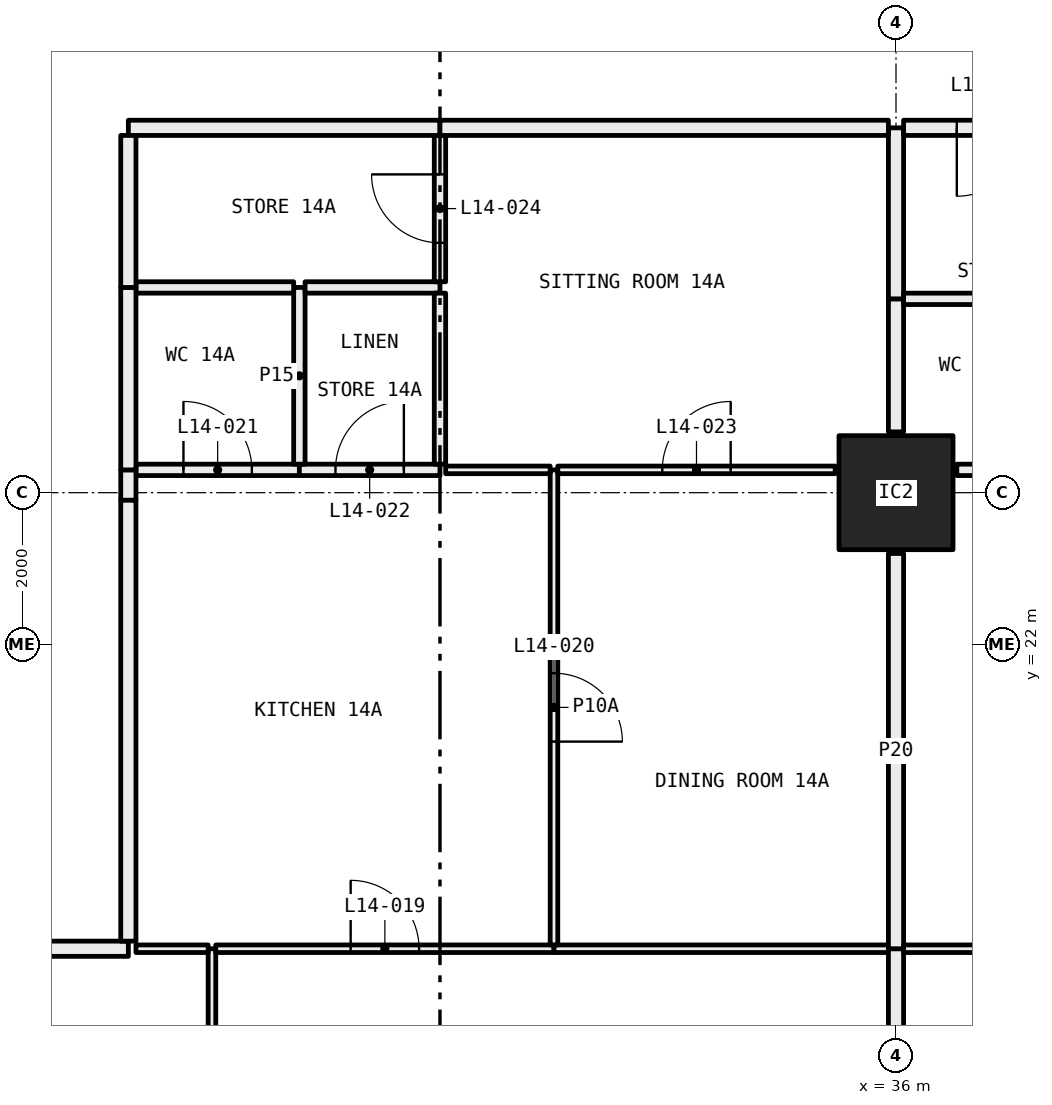
"""IFC4 building model, lengths in metres.
Left out: names, types, materials, properties, quantities, classifications, styles, units other than length and angle.
Written with IfcOpenShell. Run it as: python <this file> out.ifc"""

import sys

from ifc_helpers import new_model, si_unit, direction, frame, frame_2d, origin, origin_2d, place, context, subcontext, project, spatial, rectangle, hollow_rectangle, extrude, element, fill, save


model = new_model("IFC4")
c1 = context("Model", 3, precision=1e-05, world=origin(), true_north=direction((0.0, 1.0)))
c2 = subcontext(c1, "Body", "Model", "MODEL_VIEW")
j1 = project(units=[si_unit("LENGTHUNIT", "METRE"), si_unit("PLANEANGLEUNIT", "RADIAN")], contexts=[c1])
p1 = place(None, origin())
s1 = spatial("IfcSite", under=j1, at=p1, CompositionType="ELEMENT")
p2 = place(p1, origin())
s2 = spatial("IfcBuilding", under=s1, at=p2, CompositionType="ELEMENT")
p3 = place(p2, frame((0.0, 0.0, 61.05)))
s3 = spatial("IfcBuildingStorey", under=s2, at=p3, CompositionType="ELEMENT", Elevation=61.05)
p4 = place(p3, frame((36.0, 24.0, 0.0), z_axis=(0.0, 0.0, 1.0), x_axis=(1.0, 0.0, 0.0)))
e1 = element("IfcColumn", 1, at=p4, inside=s3, PredefinedType="COLUMN", context=c2, shape_type="SweptSolid", body=[
    extrude(hollow_rectangle(XDim=1.5, YDim=1.5, WallThickness=0.065, at=origin_2d()), origin(), (0.0, 0.0, 1.0), 3.05),
])
p5 = place(p3, frame((27.0, 12.05, 0.0), z_axis=(0.0, 0.0, 1.0), x_axis=(0.0, 1.0, 0.0)))
e2 = element("IfcWall", 2, at=p5, inside=s3, PredefinedType="PARTITIONING", context=c2, shape_type="SweptSolid", body=[
    extrude(rectangle(XDim=5.95, YDim=0.1, at=frame_2d((2.975, 0.0))), origin(), (0.0, 0.0, 1.0), 2.45),
])
p6 = place(p3, frame((26.95, 18.0, 0.0), z_axis=(0.0, 0.0, 1.0), x_axis=(-1.0, 0.0, 0.0)))
e3 = element("IfcWall", 3, at=p6, inside=s3, PredefinedType="PARTITIONING", context=c2, shape_type="SweptSolid", body=[
    extrude(rectangle(XDim=0.95, YDim=0.1, at=frame_2d((0.475, 0.0))), origin(), (0.0, 0.0, 1.0), 3.05),
])
p7 = place(p3, frame((25.9, 18.0, 0.0), z_axis=(0.0, 0.0, 1.0), x_axis=(-1.0, 0.0, 0.0)))
e4 = element("IfcWall", 4, at=p7, inside=s3, PredefinedType="PARTITIONING", context=c2, shape_type="SweptSolid", body=[
    extrude(rectangle(XDim=7.9, YDim=0.2, at=frame_2d((3.95, 0.0))), origin(), (0.0, 0.0, 1.0), 3.05),
])
p8 = place(p3, frame((31.5, 18.0, 0.0), z_axis=(0.0, 0.0, 1.0), x_axis=(-1.0, 0.0, 0.0)))
e5 = element("IfcWall", 5, at=p8, inside=s3, PredefinedType="PARTITIONING", context=c2, shape_type="SweptSolid", body=[
    extrude(rectangle(XDim=4.45, YDim=0.1, at=frame_2d((2.225, 0.0))), origin(), (0.0, 0.0, 1.0), 3.05),
])
p9 = place(p8, frame((1.775, 0.0, 0.0)))
e6 = element("IfcOpeningElement", 6, at=p9, cuts=e5, PredefinedType="OPENING", context=c2, shape_type="SweptSolid", body=[
    extrude(rectangle(XDim=0.9, YDim=2.1, at=frame_2d((0.45, 1.05))), frame((0.0, 0.06, 0.0), z_axis=(0.0, -1.0, 0.0), x_axis=(1.0, 0.0, 0.0)), (0.0, 0.0, 1.0), 0.12),
])
p10 = place(p3, frame((35.9, 18.0, 0.0), z_axis=(0.0, 0.0, 1.0), x_axis=(-1.0, 0.0, 0.0)))
e7 = element("IfcWall", 7, at=p10, inside=s3, PredefinedType="PARTITIONING", context=c2, shape_type="SweptSolid", body=[
    extrude(rectangle(XDim=4.4, YDim=0.1, at=frame_2d((2.2, 0.0))), origin(), (0.0, 0.0, 1.0), 3.05),
])
p11 = place(p3, frame((36.0, 12.8, 0.0), z_axis=(0.0, 0.0, 1.0), x_axis=(0.0, 1.0, 0.0)))
e8 = element("IfcWall", 8, at=p11, inside=s3, PredefinedType="PARTITIONING", context=c2, shape_type="SweptSolid", body=[
    extrude(rectangle(XDim=5.2, YDim=0.2, at=frame_2d((2.6, 0.0))), origin(), (0.0, 0.0, 1.0), 2.45),
])
p12 = place(p3, frame((31.5, 18.05, 0.0), z_axis=(0.0, 0.0, 1.0), x_axis=(0.0, 1.0, 0.0)))
e9 = element("IfcWall", 9, at=p12, inside=s3, PredefinedType="PARTITIONING", context=c2, shape_type="SweptSolid", body=[
    extrude(rectangle(XDim=6.25, YDim=0.1, at=frame_2d((3.125, 0.0))), origin(), (0.0, 0.0, 1.0), 2.45),
])
p13 = place(p12, frame((2.675, 0.0, 0.0)))
e10 = element("IfcOpeningElement", 10, at=p13, cuts=e9, PredefinedType="OPENING", context=c2, shape_type="SweptSolid", body=[
    extrude(rectangle(XDim=0.9, YDim=2.1, at=frame_2d((0.45, 1.05))), frame((0.0, 0.06, 0.0), z_axis=(0.0, -1.0, 0.0), x_axis=(1.0, 0.0, 0.0)), (0.0, 0.0, 1.0), 0.12),
])
p14 = place(p3, frame((28.15, 24.3, 0.0), z_axis=(0.0, 0.0, 1.0), x_axis=(-1.0, 0.0, 0.0)))
e11 = element("IfcWall", 11, at=p14, inside=s3, PredefinedType="PARTITIONING", context=c2, shape_type="SweptSolid", body=[
    extrude(rectangle(XDim=2.15, YDim=0.15, at=frame_2d((1.075, 0.0))), origin(), (0.0, 0.0, 1.0), 3.05),
])
p15 = place(p14, frame((0.625, 0.0, 0.0)))
e12 = element("IfcOpeningElement", 12, at=p15, cuts=e11, PredefinedType="OPENING", context=c2, shape_type="SweptSolid", body=[
    extrude(rectangle(XDim=0.9, YDim=2.1, at=frame_2d((0.45, 1.05))), frame((0.0, 0.085, 0.0), z_axis=(0.0, -1.0, 0.0), x_axis=(1.0, 0.0, 0.0)), (0.0, 0.0, 1.0), 0.17),
])
p16 = place(p3, frame((30.0, 24.3, 0.0), z_axis=(0.0, 0.0, 1.0), x_axis=(-1.0, 0.0, 0.0)))
e13 = element("IfcWall", 13, at=p16, inside=s3, PredefinedType="PARTITIONING", context=c2, shape_type="SweptSolid", body=[
    extrude(rectangle(XDim=1.85, YDim=0.15, at=frame_2d((0.925, 0.0))), origin(), (0.0, 0.0, 1.0), 3.05),
])
p17 = place(p16, frame((0.475, 0.0, 0.0)))
e14 = element("IfcOpeningElement", 14, at=p17, cuts=e13, PredefinedType="OPENING", context=c2, shape_type="SweptSolid", body=[
    extrude(rectangle(XDim=0.9, YDim=2.1, at=frame_2d((0.45, 1.05))), frame((0.0, 0.085, 0.0), z_axis=(0.0, -1.0, 0.0), x_axis=(1.0, 0.0, 0.0)), (0.0, 0.0, 1.0), 0.17),
])
p18 = place(p3, frame((31.45, 24.3, 0.0), z_axis=(0.0, 0.0, 1.0), x_axis=(-1.0, 0.0, 0.0)))
e15 = element("IfcWall", 15, at=p18, inside=s3, PredefinedType="PARTITIONING", context=c2, shape_type="SweptSolid", body=[
    extrude(rectangle(XDim=1.375, YDim=0.1, at=frame_2d((0.688, 0.0))), origin(), (0.0, 0.0, 1.0), 3.05),
])
p19 = place(p3, frame((25.9, 24.3, 0.0), z_axis=(0.0, 0.0, 1.0), x_axis=(0.0, -1.0, 0.0)))
e16 = element("IfcWall", 16, at=p19, inside=s3, PredefinedType="PARTITIONING", context=c2, shape_type="SweptSolid", body=[
    extrude(rectangle(XDim=0.4, YDim=0.2, at=frame_2d((0.2, 0.0))), origin(), (0.0, 0.0, 1.0), 2.45),
])
p20 = place(p3, frame((25.9, 23.9, 0.0), z_axis=(0.0, 0.0, 1.0), x_axis=(0.0, -1.0, 0.0)))
e17 = element("IfcWall", 17, at=p20, inside=s3, PredefinedType="PARTITIONING", context=c2, shape_type="SweptSolid", body=[
    extrude(rectangle(XDim=5.8, YDim=0.2, at=frame_2d((2.9, 0.0))), origin(), (0.0, 0.0, 1.0), 3.05),
])
p21 = place(p3, frame((35.2, 24.3, 0.0), z_axis=(0.0, 0.0, 1.0), x_axis=(-1.0, 0.0, 0.0)))
e18 = element("IfcWall", 18, at=p21, inside=s3, PredefinedType="PARTITIONING", context=c2, shape_type="SweptSolid", body=[
    extrude(rectangle(XDim=3.65, YDim=0.1, at=frame_2d((1.825, 0.0))), origin(), (0.0, 0.0, 1.0), 3.05),
])
p22 = place(p21, frame((1.375, 0.0, 0.0)))
e19 = element("IfcOpeningElement", 19, at=p22, cuts=e18, PredefinedType="OPENING", context=c2, shape_type="SweptSolid", body=[
    extrude(rectangle(XDim=0.9, YDim=2.1, at=frame_2d((0.45, 1.05))), frame((0.0, 0.06, 0.0), z_axis=(0.0, -1.0, 0.0), x_axis=(1.0, 0.0, 0.0)), (0.0, 0.0, 1.0), 0.12),
])
p23 = place(p3, frame((36.0, 18.0, 0.0), z_axis=(0.0, 0.0, 1.0), x_axis=(0.0, 1.0, 0.0)))
e20 = element("IfcWall", 20, at=p23, inside=s3, PredefinedType="PARTITIONING", context=c2, shape_type="SweptSolid", body=[
    extrude(rectangle(XDim=5.2, YDim=0.2, at=frame_2d((2.6, 0.0))), origin(), (0.0, 0.0, 1.0), 2.45),
])
p24 = place(p3, frame((28.15, 24.375, 0.0), z_axis=(0.0, 0.0, 1.0), x_axis=(0.0, 1.0, 0.0)))
e21 = element("IfcWall", 21, at=p24, inside=s3, PredefinedType="PARTITIONING", context=c2, shape_type="SweptSolid", body=[
    extrude(rectangle(XDim=2.325, YDim=0.15, at=frame_2d((1.163, 0.0))), origin(), (0.0, 0.0, 1.0), 3.05),
])
p25 = place(p3, frame((28.075, 26.7, 0.0), z_axis=(0.0, 0.0, 1.0), x_axis=(-1.0, 0.0, 0.0)))
e22 = element("IfcWall", 22, at=p25, inside=s3, PredefinedType="PARTITIONING", context=c2, shape_type="SweptSolid", body=[
    extrude(rectangle(XDim=2.075, YDim=0.15, at=frame_2d((1.038, 0.0))), origin(), (0.0, 0.0, 1.0), 3.05),
])
p26 = place(p3, frame((25.9, 26.7, 0.0), z_axis=(0.0, 0.0, 1.0), x_axis=(0.0, -1.0, 0.0)))
e23 = element("IfcWall", 23, at=p26, inside=s3, PredefinedType="PARTITIONING", context=c2, shape_type="SweptSolid", body=[
    extrude(rectangle(XDim=2.4, YDim=0.2, at=frame_2d((1.2, 0.0))), origin(), (0.0, 0.0, 1.0), 3.05),
])
p27 = place(p3, frame((30.0, 26.7, 0.0), z_axis=(0.0, 0.0, 1.0), x_axis=(-1.0, 0.0, 0.0)))
e24 = element("IfcWall", 24, at=p27, inside=s3, PredefinedType="PARTITIONING", context=c2, shape_type="SweptSolid", body=[
    extrude(rectangle(XDim=1.775, YDim=0.15, at=frame_2d((0.887, 0.0))), origin(), (0.0, 0.0, 1.0), 3.05),
])
p28 = place(p3, frame((30.0, 24.375, 0.0), z_axis=(0.0, 0.0, 1.0), x_axis=(0.0, 1.0, 0.0)))
e25 = element("IfcWall", 25, at=p28, inside=s3, PredefinedType="PARTITIONING", context=c2, shape_type="SweptSolid", body=[
    extrude(rectangle(XDim=2.25, YDim=0.15, at=frame_2d((1.125, 0.0))), origin(), (0.0, 0.0, 1.0), 3.05),
])
p29 = place(p3, frame((30.0, 26.775, 0.0), z_axis=(0.0, 0.0, 1.0), x_axis=(0.0, 1.0, 0.0)))
e26 = element("IfcWall", 26, at=p29, inside=s3, PredefinedType="PARTITIONING", context=c2, shape_type="SweptSolid", body=[
    extrude(rectangle(XDim=1.925, YDim=0.15, at=frame_2d((0.962, 0.0))), origin(), (0.0, 0.0, 1.0), 3.05),
])
p30 = place(p29, frame((0.512, 0.0, 0.0)))
e27 = element("IfcOpeningElement", 27, at=p30, cuts=e26, PredefinedType="OPENING", context=c2, shape_type="SweptSolid", body=[
    extrude(rectangle(XDim=0.9, YDim=2.1, at=frame_2d((0.45, 1.05))), frame((0.0, 0.085, 0.0), z_axis=(0.0, -1.0, 0.0), x_axis=(1.0, 0.0, 0.0)), (0.0, 0.0, 1.0), 0.17),
])
p31 = place(p3, frame((30.0, 28.8, 0.0), z_axis=(0.0, 0.0, 1.0), x_axis=(-1.0, 0.0, 0.0)))
e28 = element("IfcWall", 28, at=p31, inside=s3, PredefinedType="PARTITIONING", context=c2, shape_type="SweptSolid", body=[
    extrude(rectangle(XDim=4.1, YDim=0.2, at=frame_2d((2.05, 0.0))), origin(), (0.0, 0.0, 1.0), 3.05),
])
p32 = place(p3, frame((25.9, 28.7, 0.0), z_axis=(0.0, 0.0, 1.0), x_axis=(0.0, -1.0, 0.0)))
e29 = element("IfcWall", 29, at=p32, inside=s3, PredefinedType="PARTITIONING", context=c2, shape_type="SweptSolid", body=[
    extrude(rectangle(XDim=2.0, YDim=0.2, at=frame_2d((1.0, 0.0))), origin(), (0.0, 0.0, 1.0), 3.05),
])
p33 = place(p3, frame((36.0, 24.8, 0.0), z_axis=(0.0, 0.0, 1.0), x_axis=(0.0, 1.0, 0.0)))
e30 = element("IfcWall", 30, at=p33, inside=s3, PredefinedType="PARTITIONING", context=c2, shape_type="SweptSolid", body=[
    extrude(rectangle(XDim=1.75, YDim=0.2, at=frame_2d((0.875, 0.0))), origin(), (0.0, 0.0, 1.0), 2.45),
])
p34 = place(p3, frame((36.0, 26.55, 0.0), z_axis=(0.0, 0.0, 1.0), x_axis=(0.0, 1.0, 0.0)))
e31 = element("IfcWall", 31, at=p34, inside=s3, PredefinedType="PARTITIONING", context=c2, shape_type="SweptSolid", body=[
    extrude(rectangle(XDim=2.25, YDim=0.2, at=frame_2d((1.125, 0.0))), origin(), (0.0, 0.0, 1.0), 2.45),
])
p35 = place(p3, frame((35.9, 28.8, 0.0), z_axis=(0.0, 0.0, 1.0), x_axis=(-1.0, 0.0, 0.0)))
e32 = element("IfcWall", 32, at=p35, inside=s3, PredefinedType="PARTITIONING", context=c2, shape_type="SweptSolid", body=[
    extrude(rectangle(XDim=5.9, YDim=0.2, at=frame_2d((2.95, 0.0))), origin(), (0.0, 0.0, 1.0), 3.05),
])
p36 = place(p3, frame((40.5, 18.0, 0.0), z_axis=(0.0, 0.0, 1.0), x_axis=(-1.0, 0.0, 0.0)))
e33 = element("IfcWall", 33, at=p36, inside=s3, PredefinedType="PARTITIONING", context=c2, shape_type="SweptSolid", body=[
    extrude(rectangle(XDim=4.4, YDim=0.1, at=frame_2d((2.2, 0.0))), origin(), (0.0, 0.0, 1.0), 3.05),
])
p37 = place(p36, frame((1.75, 0.0, 0.0)))
e34 = element("IfcOpeningElement", 34, at=p37, cuts=e33, PredefinedType="OPENING", context=c2, shape_type="SweptSolid", body=[
    extrude(rectangle(XDim=0.9, YDim=2.1, at=frame_2d((0.45, 1.05))), frame((0.0, 0.06, 0.0), z_axis=(0.0, -1.0, 0.0), x_axis=(1.0, 0.0, 0.0)), (0.0, 0.0, 1.0), 0.12),
])
p38 = place(p3, frame((38.4, 24.3, 0.0), z_axis=(0.0, 0.0, 1.0), x_axis=(-1.0, 0.0, 0.0)))
e35 = element("IfcWall", 35, at=p38, inside=s3, PredefinedType="PARTITIONING", context=c2, shape_type="SweptSolid", body=[
    extrude(rectangle(XDim=1.6, YDim=0.15, at=frame_2d((0.8, 0.0))), origin(), (0.0, 0.0, 1.0), 3.05),
])
p39 = place(p38, frame((0.35, 0.0, 0.0)))
e36 = element("IfcOpeningElement", 36, at=p39, cuts=e35, PredefinedType="OPENING", context=c2, shape_type="SweptSolid", body=[
    extrude(rectangle(XDim=0.9, YDim=2.1, at=frame_2d((0.45, 1.05))), frame((0.0, 0.085, 0.0), z_axis=(0.0, -1.0, 0.0), x_axis=(1.0, 0.0, 0.0)), (0.0, 0.0, 1.0), 0.17),
])
p40 = place(p3, frame((38.4, 26.55, 0.0), z_axis=(0.0, 0.0, 1.0), x_axis=(-1.0, 0.0, 0.0)))
e37 = element("IfcWall", 37, at=p40, inside=s3, PredefinedType="PARTITIONING", context=c2, shape_type="SweptSolid", body=[
    extrude(rectangle(XDim=2.3, YDim=0.15, at=frame_2d((1.15, 0.0))), origin(), (0.0, 0.0, 1.0), 3.05),
])
p41 = place(p3, frame((38.4, 28.8, 0.0), z_axis=(0.0, 0.0, 1.0), x_axis=(-1.0, 0.0, 0.0)))
e38 = element("IfcWall", 38, at=p41, inside=s3, PredefinedType="PARTITIONING", context=c2, shape_type="SweptSolid", body=[
    extrude(rectangle(XDim=2.3, YDim=0.2, at=frame_2d((1.15, 0.0))), origin(), (0.0, 0.0, 1.0), 3.05),
])
p42 = place(p41, frame((0.7, 0.0, 0.0)))
e39 = element("IfcOpeningElement", 39, at=p42, cuts=e38, PredefinedType="OPENING", context=c2, shape_type="SweptSolid", body=[
    extrude(rectangle(XDim=0.9, YDim=2.1, at=frame_2d((0.45, 1.05))), frame((0.0, 0.11, 0.0), z_axis=(0.0, -1.0, 0.0), x_axis=(1.0, 0.0, 0.0)), (0.0, 0.0, 1.0), 0.22),
])
p43 = place(p9, frame((0.9, 0.0, 0.0), x_axis=(-1.0, 0.0, 0.0)))
e40 = element("IfcDoor", 40, at=p43, inside=s3, OperationType="SINGLE_SWING_RIGHT", PredefinedType="DOOR", context=c2, shape_type="SweptSolid", body=[
    extrude(rectangle(XDim=0.9, YDim=2.1, at=frame_2d((0.45, 1.05))), frame((0.0, 0.025, 0.0), z_axis=(0.0, -1.0, 0.0), x_axis=(1.0, 0.0, 0.0)), (0.0, 0.0, 1.0), 0.05),
])
fill(e6, e40)
p44 = place(p13, frame((0.9, 0.0, 0.0), x_axis=(-1.0, 0.0, 0.0)))
e41 = element("IfcDoor", 41, at=p44, inside=s3, OperationType="SINGLE_SWING_LEFT", PredefinedType="DOOR", context=c2, shape_type="SweptSolid", body=[
    extrude(rectangle(XDim=0.9, YDim=2.1, at=frame_2d((0.45, 1.05))), frame((0.0, 0.025, 0.0), z_axis=(0.0, -1.0, 0.0), x_axis=(1.0, 0.0, 0.0)), (0.0, 0.0, 1.0), 0.05),
])
fill(e10, e41)
p45 = place(p15, frame((0.9, 0.0, 0.0), x_axis=(-1.0, 0.0, 0.0)))
e42 = element("IfcDoor", 42, at=p45, inside=s3, OperationType="SINGLE_SWING_RIGHT", PredefinedType="DOOR", context=c2, shape_type="SweptSolid", body=[
    extrude(rectangle(XDim=0.9, YDim=2.1, at=frame_2d((0.45, 1.05))), frame((0.0, 0.025, 0.0), z_axis=(0.0, -1.0, 0.0), x_axis=(1.0, 0.0, 0.0)), (0.0, 0.0, 1.0), 0.05),
])
fill(e12, e42)
p46 = place(p17, frame((0.9, 0.0, 0.0), x_axis=(-1.0, 0.0, 0.0)))
e43 = element("IfcDoor", 43, at=p46, inside=s3, OperationType="SINGLE_SWING_LEFT", PredefinedType="DOOR", context=c2, shape_type="SweptSolid", body=[
    extrude(rectangle(XDim=0.9, YDim=2.1, at=frame_2d((0.45, 1.05))), frame((0.0, 0.025, 0.0), z_axis=(0.0, -1.0, 0.0), x_axis=(1.0, 0.0, 0.0)), (0.0, 0.0, 1.0), 0.05),
])
fill(e14, e43)
p47 = place(p22, frame((0.9, 0.0, 0.0), x_axis=(-1.0, 0.0, 0.0)))
e44 = element("IfcDoor", 44, at=p47, inside=s3, OperationType="SINGLE_SWING_LEFT", PredefinedType="DOOR", context=c2, shape_type="SweptSolid", body=[
    extrude(rectangle(XDim=0.9, YDim=2.1, at=frame_2d((0.45, 1.05))), frame((0.0, 0.025, 0.0), z_axis=(0.0, -1.0, 0.0), x_axis=(1.0, 0.0, 0.0)), (0.0, 0.0, 1.0), 0.05),
])
fill(e19, e44)
p48 = place(p30, origin())
e45 = element("IfcDoor", 45, at=p48, inside=s3, OperationType="SINGLE_SWING_LEFT", PredefinedType="DOOR", context=c2, shape_type="SweptSolid", body=[
    extrude(rectangle(XDim=0.9, YDim=2.1, at=frame_2d((0.45, 1.05))), frame((0.0, 0.025, 0.0), z_axis=(0.0, -1.0, 0.0), x_axis=(1.0, 0.0, 0.0)), (0.0, 0.0, 1.0), 0.05),
])
fill(e27, e45)
p49 = place(p42, origin())
e46 = element("IfcDoor", 46, at=p49, inside=s3, OperationType="SINGLE_SWING_LEFT", PredefinedType="DOOR", context=c2, shape_type="SweptSolid", body=[
    extrude(rectangle(XDim=0.9, YDim=2.1, at=frame_2d((0.45, 1.05))), frame((0.0, 0.025, 0.0), z_axis=(0.0, -1.0, 0.0), x_axis=(1.0, 0.0, 0.0)), (0.0, 0.0, 1.0), 0.05),
])
fill(e39, e46)
save(model, sys.argv[1])
